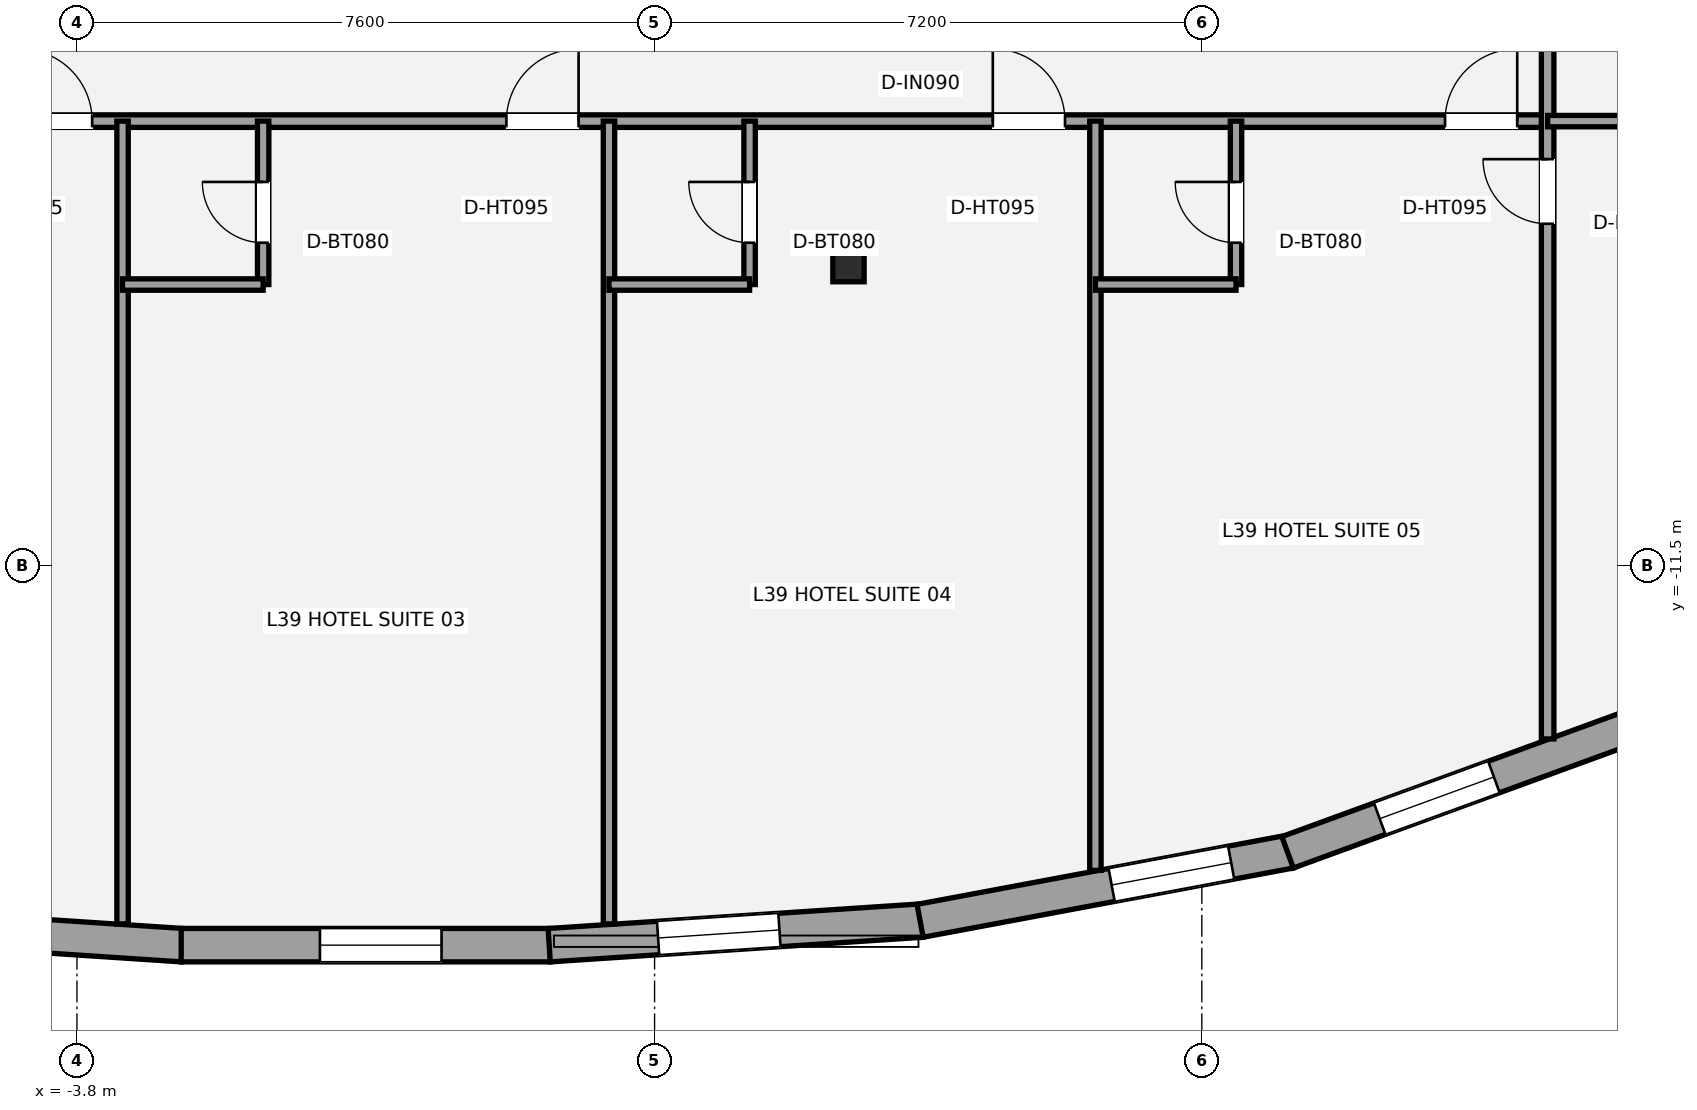
"""IFC4 building model, lengths in metres.
Left out: names, types, materials, properties, quantities, classifications, styles, units other than length and angle.
Written with IfcOpenShell. Run it as: python <this file> out.ifc"""

import sys

from ifc_helpers import new_model, si_unit, direction, frame, frame_2d, origin, origin_2d, place, context, subcontext, project, spatial, rectangle, i_section, extrude, element, fill, save


model = new_model("IFC4")
c1 = context("Model", 3, precision=1e-05, world=origin(), true_north=direction((0.0, 1.0)))
c2 = subcontext(c1, "Body", "Model", "MODEL_VIEW")
j1 = project(units=[si_unit("LENGTHUNIT", "METRE"), si_unit("PLANEANGLEUNIT", "RADIAN")], contexts=[c1])
p1 = place(None, origin())
s1 = spatial("IfcSite", under=j1, at=p1, CompositionType="ELEMENT")
p2 = place(p1, origin())
s2 = spatial("IfcBuilding", under=s1, at=p2, CompositionType="ELEMENT")
p3 = place(p2, frame((0.0, 0.0, 147.0)))
s3 = spatial("IfcBuildingStorey", under=s2, at=p3, CompositionType="ELEMENT", Elevation=147.0)
p4 = place(p3, frame((6.351, -7.546, 0.0), z_axis=(0.0, 0.0, 1.0), x_axis=(1.0, 0.0, 0.0)))
e1 = element("IfcColumn", 1, at=p4, inside=s3, PredefinedType="COLUMN", context=c2, shape_type="SweptSolid", body=[
    extrude(i_section(OverallWidth=0.412, OverallDepth=0.435, WebThickness=0.036, FlangeThickness=0.057, at=origin_2d()), origin(), (0.0, 0.0, 1.0), 3.2),
])
p5 = place(p3, frame((-2.414, -16.492, 0.0), z_axis=(0.0, 0.0, 1.0), x_axis=(-0.997822793171, 0.065952054018, 0.0)))
e2 = element("IfcWall", 2, at=p5, inside=s3, PredefinedType="STANDARD", context=c2, shape_type="SweptSolid", body=[
    extrude(rectangle(XDim=4.916, YDim=0.44, at=frame_2d((2.458, 0.0))), origin(), (0.0, 0.0, 1.0), 2.315),
])
p6 = place(p5, frame((1.831, 0.0, 0.58)))
e3 = element("IfcOpeningElement", 3, at=p6, cuts=e2, PredefinedType="OPENING", context=c2, shape_type="SweptSolid", body=[
    extrude(rectangle(XDim=1.6, YDim=1.55, at=frame_2d((0.8, 0.775))), frame((0.0, 0.23, 0.0), z_axis=(0.0, -1.0, 0.0), x_axis=(1.0, 0.0, 0.0)), (0.0, 0.0, 1.0), 0.46),
])
p7 = place(p3, frame((2.428, -16.491, 0.0), z_axis=(0.0, 0.0, 1.0), x_axis=(-1.0, 0.0, 0.0)))
e4 = element("IfcWall", 4, at=p7, inside=s3, PredefinedType="STANDARD", context=c2, shape_type="SweptSolid", body=[
    extrude(rectangle(XDim=4.856, YDim=0.44, at=frame_2d((2.428, 0.0))), origin(), (0.0, 0.0, 1.0), 2.315),
])
p8 = place(p7, frame((1.431, 0.0, 0.58)))
e5 = element("IfcOpeningElement", 5, at=p8, cuts=e4, PredefinedType="OPENING", context=c2, shape_type="SweptSolid", body=[
    extrude(rectangle(XDim=1.6, YDim=1.55, at=frame_2d((0.8, 0.775))), frame((0.0, 0.23, 0.0), z_axis=(0.0, -1.0, 0.0), x_axis=(1.0, 0.0, 0.0)), (0.0, 0.0, 1.0), 0.46),
])
p9 = place(p3, frame((7.319, -16.167, 0.0), z_axis=(0.0, 0.0, 1.0), x_axis=(-0.997822793171, -0.065952054018, 0.0)))
e6 = element("IfcWall", 6, at=p9, inside=s3, PredefinedType="STANDARD", context=c2, shape_type="SweptSolid", body=[
    extrude(rectangle(XDim=4.916, YDim=0.44, at=frame_2d((2.458, 0.0))), origin(), (0.0, 0.0, 1.0), 2.315),
])
p10 = place(p9, frame((1.881, 0.0, 0.58)))
e7 = element("IfcOpeningElement", 7, at=p10, cuts=e6, PredefinedType="OPENING", context=c2, shape_type="SweptSolid", body=[
    extrude(rectangle(XDim=1.6, YDim=1.55, at=frame_2d((0.8, 0.775))), frame((0.0, 0.23, 0.0), z_axis=(0.0, -1.0, 0.0), x_axis=(1.0, 0.0, 0.0)), (0.0, 0.0, 1.0), 0.46),
])
p11 = place(p3, frame((12.164, -15.26, 0.0), z_axis=(0.0, 0.0, 1.0), x_axis=(-0.98297578121, -0.183735172338, 0.0)))
e8 = element("IfcWall", 8, at=p11, inside=s3, PredefinedType="STANDARD", context=c2, shape_type="SweptSolid", body=[
    extrude(rectangle(XDim=4.955, YDim=0.44, at=frame_2d((2.478, 0.0))), origin(), (0.0, 0.0, 1.0), 2.315),
])
p12 = place(p11, frame((0.791, 0.0, 0.58)))
e9 = element("IfcOpeningElement", 9, at=p12, cuts=e8, PredefinedType="OPENING", context=c2, shape_type="SweptSolid", body=[
    extrude(rectangle(XDim=1.6, YDim=1.55, at=frame_2d((0.8, 0.775))), frame((0.0, 0.23, 0.0), z_axis=(0.0, -1.0, 0.0), x_axis=(1.0, 0.0, 0.0)), (0.0, 0.0, 1.0), 0.46),
])
p13 = place(p3, frame((16.66, -13.615, 0.0), z_axis=(0.0, 0.0, 1.0), x_axis=(-0.939349296455, -0.342961950147, 0.0)))
e10 = element("IfcWall", 10, at=p13, inside=s3, PredefinedType="STANDARD", context=c2, shape_type="SweptSolid", body=[
    extrude(rectangle(XDim=4.823, YDim=0.44, at=frame_2d((2.412, 0.0))), origin(), (0.0, 0.0, 1.0), 2.315),
])
p14 = place(p13, frame((1.934, 0.0, 0.58)))
e11 = element("IfcOpeningElement", 11, at=p14, cuts=e10, PredefinedType="OPENING", context=c2, shape_type="SweptSolid", body=[
    extrude(rectangle(XDim=1.6, YDim=1.55, at=frame_2d((0.8, 0.775))), frame((0.0, 0.23, 0.0), z_axis=(0.0, -1.0, 0.0), x_axis=(1.0, 0.0, 0.0)), (0.0, 0.0, 1.0), 0.46),
])
p15 = place(p3, frame((-15.55, -5.65, 0.0), z_axis=(0.0, 0.0, 1.0), x_axis=(1.0, 0.0, 0.0)))
e12 = element("IfcWall", 12, at=p15, inside=s3, PredefinedType="PARTITIONING", context=c2, shape_type="SweptSolid", body=[
    extrude(rectangle(XDim=31.1, YDim=0.165, at=frame_2d((15.55, 0.0))), origin(), (0.0, 0.0, 1.0), 2.398),
])
p16 = place(p15, frame((4.6, 0.0, 0.0)))
e13 = element("IfcOpeningElement", 13, at=p16, cuts=e12, PredefinedType="OPENING", context=c2, shape_type="SweptSolid", body=[
    extrude(rectangle(XDim=0.95, YDim=2.15, at=frame_2d((0.475, 1.075))), frame((0.0, 0.093, 0.0), z_axis=(0.0, -1.0, 0.0), x_axis=(1.0, 0.0, 0.0)), (0.0, 0.0, 1.0), 0.185),
])
p17 = place(p15, frame((11.0, 0.0, 0.0)))
e14 = element("IfcOpeningElement", 14, at=p17, cuts=e12, PredefinedType="OPENING", context=c2, shape_type="SweptSolid", body=[
    extrude(rectangle(XDim=0.95, YDim=2.15, at=frame_2d((0.475, 1.075))), frame((0.0, 0.093, 0.0), z_axis=(0.0, -1.0, 0.0), x_axis=(1.0, 0.0, 0.0)), (0.0, 0.0, 1.0), 0.185),
])
p18 = place(p15, frame((17.4, 0.0, 0.0)))
e15 = element("IfcOpeningElement", 15, at=p18, cuts=e12, PredefinedType="OPENING", context=c2, shape_type="SweptSolid", body=[
    extrude(rectangle(XDim=0.95, YDim=2.15, at=frame_2d((0.475, 1.075))), frame((0.0, 0.093, 0.0), z_axis=(0.0, -1.0, 0.0), x_axis=(1.0, 0.0, 0.0)), (0.0, 0.0, 1.0), 0.185),
])
p19 = place(p15, frame((23.8, 0.0, 0.0)))
e16 = element("IfcOpeningElement", 16, at=p19, cuts=e12, PredefinedType="OPENING", context=c2, shape_type="SweptSolid", body=[
    extrude(rectangle(XDim=0.95, YDim=2.15, at=frame_2d((0.475, 1.075))), frame((0.0, 0.093, 0.0), z_axis=(0.0, -1.0, 0.0), x_axis=(1.0, 0.0, 0.0)), (0.0, 0.0, 1.0), 0.185),
])
p20 = place(p15, frame((29.75, 0.0, 0.0)))
e17 = element("IfcOpeningElement", 17, at=p20, cuts=e12, PredefinedType="OPENING", context=c2, shape_type="SweptSolid", body=[
    extrude(rectangle(XDim=0.95, YDim=2.15, at=frame_2d((0.475, 1.075))), frame((0.0, 0.093, 0.0), z_axis=(0.0, -1.0, 0.0), x_axis=(1.0, 0.0, 0.0)), (0.0, 0.0, 1.0), 0.185),
])
p21 = place(p3, frame((15.55, -13.778, 0.0), z_axis=(0.0, 0.0, 1.0), x_axis=(0.0, 1.0, 0.0)))
e18 = element("IfcWall", 18, at=p21, inside=s3, PredefinedType="PARTITIONING", context=c2, shape_type="SweptSolid", body=[
    extrude(rectangle(XDim=21.328, YDim=0.165, at=frame_2d((10.664, 0.0))), origin(), (0.0, 0.0, 1.0), 2.473),
])
p22 = place(p21, frame((6.777, 0.0, 0.0)))
e19 = element("IfcOpeningElement", 19, at=p22, cuts=e18, PredefinedType="OPENING", context=c2, shape_type="SweptSolid", body=[
    extrude(rectangle(XDim=0.85, YDim=2.1, at=frame_2d((0.425, 1.05))), frame((0.0, 0.093, 0.0), z_axis=(0.0, -1.0, 0.0), x_axis=(1.0, 0.0, 0.0)), (0.0, 0.0, 1.0), 0.185),
])
p23 = place(p21, frame((10.827, 0.0, 0.0)))
e20 = element("IfcOpeningElement", 20, at=p23, cuts=e18, PredefinedType="OPENING", context=c2, shape_type="SweptSolid", body=[
    extrude(rectangle(XDim=0.95, YDim=2.15, at=frame_2d((0.475, 1.075))), frame((0.0, 0.093, 0.0), z_axis=(0.0, -1.0, 0.0), x_axis=(1.0, 0.0, 0.0)), (0.0, 0.0, 1.0), 0.185),
])
p24 = place(p21, frame((15.227, 0.0, 0.0)))
e21 = element("IfcOpeningElement", 21, at=p24, cuts=e18, PredefinedType="OPENING", context=c2, shape_type="SweptSolid", body=[
    extrude(rectangle(XDim=0.95, YDim=2.15, at=frame_2d((0.475, 1.075))), frame((0.0, 0.093, 0.0), z_axis=(0.0, -1.0, 0.0), x_axis=(1.0, 0.0, 0.0)), (0.0, 0.0, 1.0), 0.185),
])
p25 = place(p21, frame((19.977, 0.0, 0.0)))
e22 = element("IfcOpeningElement", 22, at=p25, cuts=e18, PredefinedType="OPENING", context=c2, shape_type="SweptSolid", body=[
    extrude(rectangle(XDim=0.95, YDim=2.15, at=frame_2d((0.475, 1.075))), frame((0.0, 0.093, 0.0), z_axis=(0.0, -1.0, 0.0), x_axis=(1.0, 0.0, 0.0)), (0.0, 0.0, 1.0), 0.185),
])
p26 = place(p3, frame((15.55, -5.65, 0.0), z_axis=(0.0, 0.0, 1.0), x_axis=(1.0, 0.0, 0.0)))
e23 = element("IfcWall", 23, at=p26, inside=s3, PredefinedType="PLUMBINGWALL", context=c2, shape_type="SweptSolid", body=[
    extrude(rectangle(XDim=7.866, YDim=0.15, at=frame_2d((3.933, 0.0))), origin(), (0.0, 0.0, 1.0), 2.473),
])
for number, where, z_axis, x_axis in (
    (24, (-3.2, -16.211, 0.0), (0.0, 0.0, 1.0), (0.0, 1.0, 0.0)),
    (25, (3.2, -16.211, 0.0), (0.0, 0.0, 1.0), (0.0, 1.0, 0.0)),
):
    element("IfcWall", number, at=place(p3, frame(where, z_axis=z_axis, x_axis=x_axis)), inside=s3, PredefinedType="PLUMBINGWALL", context=c2, shape_type="SweptSolid", body=[
        extrude(rectangle(XDim=10.561, YDim=0.15, at=frame_2d((5.281, 0.0))), origin(), (0.0, 0.0, 1.0), 2.473),
    ])
p27 = place(p3, frame((9.6, -15.508, 0.0), z_axis=(0.0, 0.0, 1.0), x_axis=(0.0, 1.0, 0.0)))
e26 = element("IfcWall", 26, at=p27, inside=s3, PredefinedType="PLUMBINGWALL", context=c2, shape_type="SweptSolid", body=[
    extrude(rectangle(XDim=9.858, YDim=0.15, at=frame_2d((4.929, 0.0))), origin(), (0.0, 0.0, 1.0), 3.02),
])
p28 = place(p3, frame((-1.35, -7.8, 0.0), z_axis=(0.0, 0.0, 1.0), x_axis=(0.0, 1.0, 0.0)))
e27 = element("IfcWall", 27, at=p28, inside=s3, PredefinedType="PLUMBINGWALL", context=c2, shape_type="SweptSolid", body=[
    extrude(rectangle(XDim=2.15, YDim=0.15, at=frame_2d((1.075, 0.0))), origin(), (0.0, 0.0, 1.0), 2.473),
])
p29 = place(p28, frame((0.55, 0.0, 0.0)))
e28 = element("IfcOpeningElement", 28, at=p29, cuts=e27, PredefinedType="OPENING", context=c2, shape_type="SweptSolid", body=[
    extrude(rectangle(XDim=0.8, YDim=2.1, at=frame_2d((0.4, 1.05))), frame((0.0, 0.085, 0.0), z_axis=(0.0, -1.0, 0.0), x_axis=(1.0, 0.0, 0.0)), (0.0, 0.0, 1.0), 0.17),
])
p30 = place(p3, frame((-3.2, -7.8, 0.0), z_axis=(0.0, 0.0, 1.0), x_axis=(1.0, 0.0, 0.0)))
e29 = element("IfcWall", 29, at=p30, inside=s3, PredefinedType="PLUMBINGWALL", context=c2, shape_type="SweptSolid", body=[
    extrude(rectangle(XDim=1.85, YDim=0.15, at=frame_2d((0.925, 0.0))), origin(), (0.0, 0.0, 1.0), 3.02),
])
p31 = place(p3, frame((5.05, -7.8, 0.0), z_axis=(0.0, 0.0, 1.0), x_axis=(0.0, 1.0, 0.0)))
e30 = element("IfcWall", 30, at=p31, inside=s3, PredefinedType="PLUMBINGWALL", context=c2, shape_type="SweptSolid", body=[
    extrude(rectangle(XDim=2.15, YDim=0.15, at=frame_2d((1.075, 0.0))), origin(), (0.0, 0.0, 1.0), 3.02),
])
p32 = place(p31, frame((0.55, 0.0, 0.0)))
e31 = element("IfcOpeningElement", 31, at=p32, cuts=e30, PredefinedType="OPENING", context=c2, shape_type="SweptSolid", body=[
    extrude(rectangle(XDim=0.8, YDim=2.1, at=frame_2d((0.4, 1.05))), frame((0.0, 0.085, 0.0), z_axis=(0.0, -1.0, 0.0), x_axis=(1.0, 0.0, 0.0)), (0.0, 0.0, 1.0), 0.17),
])
p33 = place(p3, frame((3.2, -7.8, 0.0), z_axis=(0.0, 0.0, 1.0), x_axis=(1.0, 0.0, 0.0)))
e32 = element("IfcWall", 32, at=p33, inside=s3, PredefinedType="PLUMBINGWALL", context=c2, shape_type="SweptSolid", body=[
    extrude(rectangle(XDim=1.85, YDim=0.15, at=frame_2d((0.925, 0.0))), origin(), (0.0, 0.0, 1.0), 3.02),
])
p34 = place(p3, frame((11.45, -7.8, 0.0), z_axis=(0.0, 0.0, 1.0), x_axis=(0.0, 1.0, 0.0)))
e33 = element("IfcWall", 33, at=p34, inside=s3, PredefinedType="PLUMBINGWALL", context=c2, shape_type="SweptSolid", body=[
    extrude(rectangle(XDim=2.15, YDim=0.15, at=frame_2d((1.075, 0.0))), origin(), (0.0, 0.0, 1.0), 3.02),
])
p35 = place(p34, frame((0.55, 0.0, 0.0)))
e34 = element("IfcOpeningElement", 34, at=p35, cuts=e33, PredefinedType="OPENING", context=c2, shape_type="SweptSolid", body=[
    extrude(rectangle(XDim=0.8, YDim=2.1, at=frame_2d((0.4, 1.05))), frame((0.0, 0.085, 0.0), z_axis=(0.0, -1.0, 0.0), x_axis=(1.0, 0.0, 0.0)), (0.0, 0.0, 1.0), 0.17),
])
p36 = place(p3, frame((9.6, -7.8, 0.0), z_axis=(0.0, 0.0, 1.0), x_axis=(1.0, 0.0, 0.0)))
e35 = element("IfcWall", 35, at=p36, inside=s3, PredefinedType="PLUMBINGWALL", context=c2, shape_type="SweptSolid", body=[
    extrude(rectangle(XDim=1.85, YDim=0.15, at=frame_2d((0.925, 0.0))), origin(), (0.0, 0.0, 1.0), 2.473),
])
p37 = place(p8, origin())
e36 = element("IfcWindow", 36, at=p37, inside=s3, PartitioningType="SINGLE_PANEL", PredefinedType="WINDOW", context=c2, shape_type="SweptSolid", body=[
    extrude(rectangle(XDim=1.6, YDim=1.55, at=frame_2d((0.8, 0.775))), frame((0.0, -0.01, 0.0), z_axis=(0.0, -1.0, 0.0), x_axis=(1.0, 0.0, 0.0)), (0.0, 0.0, 1.0), 0.06),
])
fill(e5, e36)
p38 = place(p10, origin())
e37 = element("IfcWindow", 37, at=p38, inside=s3, PartitioningType="SINGLE_PANEL", PredefinedType="WINDOW", context=c2, shape_type="SweptSolid", body=[
    extrude(rectangle(XDim=1.6, YDim=1.55, at=frame_2d((0.8, 0.775))), frame((0.0, -0.01, 0.0), z_axis=(0.0, -1.0, 0.0), x_axis=(1.0, 0.0, 0.0)), (0.0, 0.0, 1.0), 0.06),
])
fill(e7, e37)
p39 = place(p12, origin())
e38 = element("IfcWindow", 38, at=p39, inside=s3, PartitioningType="SINGLE_PANEL", PredefinedType="WINDOW", context=c2, shape_type="SweptSolid", body=[
    extrude(rectangle(XDim=1.6, YDim=1.55, at=frame_2d((0.8, 0.775))), frame((0.0, -0.01, 0.0), z_axis=(0.0, -1.0, 0.0), x_axis=(1.0, 0.0, 0.0)), (0.0, 0.0, 1.0), 0.06),
])
fill(e9, e38)
p40 = place(p14, origin())
e39 = element("IfcWindow", 39, at=p40, inside=s3, PartitioningType="SINGLE_PANEL", PredefinedType="WINDOW", context=c2, shape_type="SweptSolid", body=[
    extrude(rectangle(XDim=1.6, YDim=1.55, at=frame_2d((0.8, 0.775))), frame((0.0, -0.01, 0.0), z_axis=(0.0, -1.0, 0.0), x_axis=(1.0, 0.0, 0.0)), (0.0, 0.0, 1.0), 0.06),
])
fill(e11, e39)
p41 = place(p22, origin())
e40 = element("IfcDoor", 40, at=p41, inside=s3, OperationType="SINGLE_SWING_RIGHT", PredefinedType="DOOR", context=c2, shape_type="SweptSolid", body=[
    extrude(rectangle(XDim=0.85, YDim=2.1, at=frame_2d((0.425, 1.05))), frame((0.0, 0.025, 0.0), z_axis=(0.0, -1.0, 0.0), x_axis=(1.0, 0.0, 0.0)), (0.0, 0.0, 1.0), 0.05),
])
fill(e19, e40)
p42 = place(p17, origin())
e41 = element("IfcDoor", 41, at=p42, inside=s3, OperationType="SINGLE_SWING_LEFT", PredefinedType="DOOR", context=c2, shape_type="SweptSolid", body=[
    extrude(rectangle(XDim=0.95, YDim=2.15, at=frame_2d((0.475, 1.075))), frame((0.0, 0.025, 0.0), z_axis=(0.0, -1.0, 0.0), x_axis=(1.0, 0.0, 0.0)), (0.0, 0.0, 1.0), 0.05),
])
fill(e14, e41)
p43 = place(p18, origin())
e42 = element("IfcDoor", 42, at=p43, inside=s3, OperationType="SINGLE_SWING_RIGHT", PredefinedType="DOOR", context=c2, shape_type="SweptSolid", body=[
    extrude(rectangle(XDim=0.95, YDim=2.15, at=frame_2d((0.475, 1.075))), frame((0.0, 0.025, 0.0), z_axis=(0.0, -1.0, 0.0), x_axis=(1.0, 0.0, 0.0)), (0.0, 0.0, 1.0), 0.05),
])
fill(e15, e42)
p44 = place(p29, origin())
e43 = element("IfcDoor", 43, at=p44, inside=s3, OperationType="SINGLE_SWING_RIGHT", PredefinedType="DOOR", context=c2, shape_type="SweptSolid", body=[
    extrude(rectangle(XDim=0.8, YDim=2.1, at=frame_2d((0.4, 1.05))), frame((0.0, 0.025, 0.0), z_axis=(0.0, -1.0, 0.0), x_axis=(1.0, 0.0, 0.0)), (0.0, 0.0, 1.0), 0.05),
])
fill(e28, e43)
p45 = place(p19, origin())
e44 = element("IfcDoor", 44, at=p45, inside=s3, OperationType="SINGLE_SWING_LEFT", PredefinedType="DOOR", context=c2, shape_type="SweptSolid", body=[
    extrude(rectangle(XDim=0.95, YDim=2.15, at=frame_2d((0.475, 1.075))), frame((0.0, 0.025, 0.0), z_axis=(0.0, -1.0, 0.0), x_axis=(1.0, 0.0, 0.0)), (0.0, 0.0, 1.0), 0.05),
])
fill(e16, e44)
p46 = place(p32, origin())
e45 = element("IfcDoor", 45, at=p46, inside=s3, OperationType="SINGLE_SWING_RIGHT", PredefinedType="DOOR", context=c2, shape_type="SweptSolid", body=[
    extrude(rectangle(XDim=0.8, YDim=2.1, at=frame_2d((0.4, 1.05))), frame((0.0, 0.025, 0.0), z_axis=(0.0, -1.0, 0.0), x_axis=(1.0, 0.0, 0.0)), (0.0, 0.0, 1.0), 0.05),
])
fill(e31, e45)
p47 = place(p20, origin())
e46 = element("IfcDoor", 46, at=p47, inside=s3, OperationType="SINGLE_SWING_RIGHT", PredefinedType="DOOR", context=c2, shape_type="SweptSolid", body=[
    extrude(rectangle(XDim=0.95, YDim=2.15, at=frame_2d((0.475, 1.075))), frame((0.0, 0.025, 0.0), z_axis=(0.0, -1.0, 0.0), x_axis=(1.0, 0.0, 0.0)), (0.0, 0.0, 1.0), 0.05),
])
fill(e17, e46)
p48 = place(p35, origin())
e47 = element("IfcDoor", 47, at=p48, inside=s3, OperationType="SINGLE_SWING_RIGHT", PredefinedType="DOOR", context=c2, shape_type="SweptSolid", body=[
    extrude(rectangle(XDim=0.8, YDim=2.1, at=frame_2d((0.4, 1.05))), frame((0.0, 0.025, 0.0), z_axis=(0.0, -1.0, 0.0), x_axis=(1.0, 0.0, 0.0)), (0.0, 0.0, 1.0), 0.05),
])
fill(e34, e47)
save(model, sys.argv[1])
